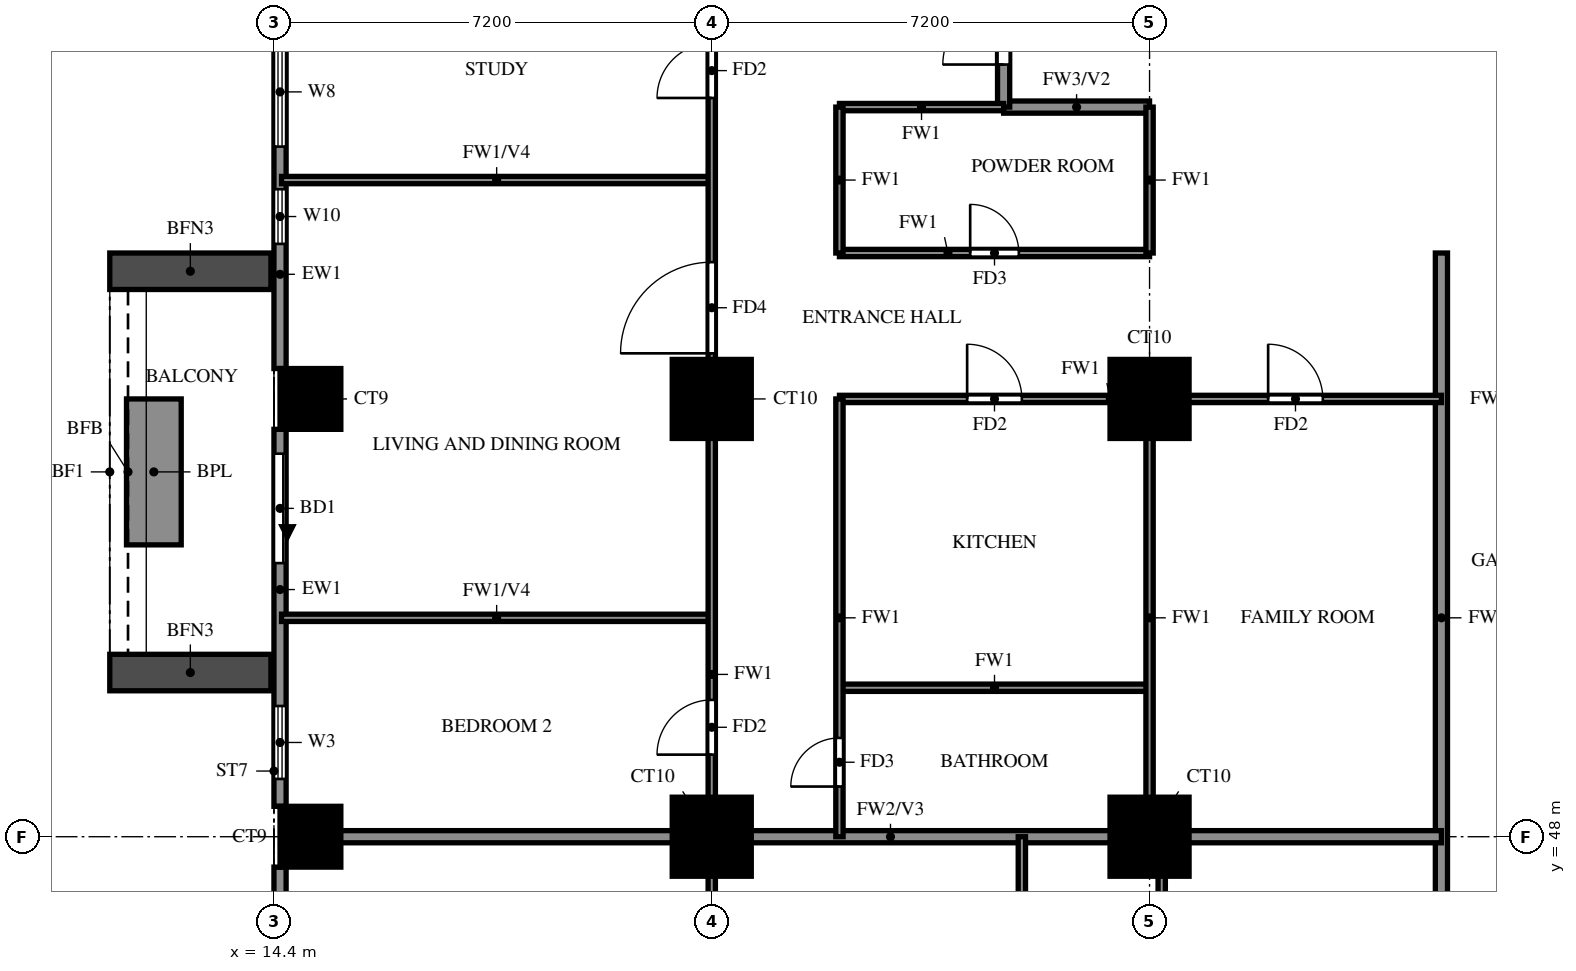
"""IFC4 building model, lengths in metres.
Left out: names, types, materials, properties, quantities, classifications, styles, units other than length and angle.
Written with IfcOpenShell. Run it as: python <this file> out.ifc"""

import sys

from ifc_helpers import new_model, si_unit, direction, frame, frame_2d, origin, origin_2d, place, context, subcontext, project, spatial, rectangle, extrude, source, transform, mapped, element, fill, save


model = new_model("IFC4")
c1 = context("Model", 3, precision=1e-05, world=origin(), true_north=direction((0.0, 1.0)))
c2 = subcontext(c1, "Body", "Model", "MODEL_VIEW")
j1 = project(units=[si_unit("LENGTHUNIT", "METRE"), si_unit("PLANEANGLEUNIT", "RADIAN")], contexts=[c1])
p1 = place(None, origin())
s1 = spatial("IfcSite", under=j1, at=p1, CompositionType="ELEMENT")
p2 = place(p1, origin())
s2 = spatial("IfcBuilding", under=s1, at=p2, CompositionType="ELEMENT")
p3 = place(p2, frame((0.0, 0.0, 83.0)))
s3 = spatial("IfcBuildingStorey", under=s2, at=p3, CompositionType="ELEMENT", Elevation=83.0)
m1 = source(origin(), c2, "Body", "SweptSolid", [
    extrude(rectangle(XDim=1.0, YDim=1.0, at=origin_2d()), origin(), (0.0, 0.0, 1.0), 3.18),
])
p4 = place(p3, frame((15.0, 48.0, 0.0), z_axis=(0.0, 0.0, 1.0), x_axis=(1.0, 0.0, 0.0)))
e1 = element("IfcColumn", 1, at=p4, inside=s3, PredefinedType="COLUMN", context=c2, shape_type="MappedRepresentation", body=[
    mapped(m1, transform((0.0, 0.0, 0.0))),
])
m2 = source(origin(), c2, "Body", "SweptSolid", [
    extrude(rectangle(XDim=1.3, YDim=1.3, at=origin_2d()), origin(), (0.0, 0.0, 1.0), 3.18),
])
for number, where, z_axis, x_axis in (
    (2, (21.6, 48.0, 0.0), (0.0, 0.0, 1.0), (1.0, 0.0, 0.0)),
    (3, (28.8, 48.0, 0.0), (0.0, 0.0, 1.0), (1.0, 0.0, 0.0)),
):
    element("IfcColumn", number, at=place(p3, frame(where, z_axis=z_axis, x_axis=x_axis)), inside=s3, PredefinedType="COLUMN", context=c2, shape_type="MappedRepresentation", body=[
        mapped(m2, transform((0.0, 0.0, 0.0))),
    ])
p5 = place(p3, frame((15.0, 55.2, 0.0), z_axis=(0.0, 0.0, 1.0), x_axis=(1.0, 0.0, 0.0)))
e4 = element("IfcColumn", 4, at=p5, inside=s3, PredefinedType="COLUMN", context=c2, shape_type="MappedRepresentation", body=[
    mapped(m1, transform((0.0, 0.0, 0.0))),
])
for number, where, z_axis, x_axis in (
    (5, (21.6, 55.2, 0.0), (0.0, 0.0, 1.0), (1.0, 0.0, 0.0)),
    (6, (28.8, 55.2, 0.0), (0.0, 0.0, 1.0), (1.0, 0.0, 0.0)),
):
    element("IfcColumn", number, at=place(p3, frame(where, z_axis=z_axis, x_axis=x_axis)), inside=s3, PredefinedType="COLUMN", context=c2, shape_type="MappedRepresentation", body=[
        mapped(m2, transform((0.0, 0.0, 0.0))),
    ])
p6 = place(p3, frame((14.5, 61.9, 0.0), z_axis=(0.0, 0.0, 1.0), x_axis=(0.0, -1.0, 0.0)))
e7 = element("IfcWall", 7, at=p6, inside=s3, PredefinedType="SOLIDWALL", context=c2, shape_type="SweptSolid", body=[
    extrude(rectangle(XDim=6.2, YDim=0.2, at=frame_2d((3.1, 0.0))), origin(), (0.0, 0.0, 1.0), 3.18),
])
p7 = place(p6, frame((3.25, 0.0, 0.6)))
e8 = element("IfcOpeningElement", 8, at=p7, cuts=e7, PredefinedType="OPENING", context=c2, shape_type="SweptSolid", body=[
    extrude(rectangle(XDim=0.9, YDim=2.4, at=frame_2d((0.45, 1.2))), frame((0.0, 0.11, 0.0), z_axis=(0.0, -1.0, 0.0), x_axis=(1.0, 0.0, 0.0)), (0.0, 0.0, 1.0), 0.22),
])
p8 = place(p6, frame((0.75, 0.0, 0.6)))
e9 = element("IfcOpeningElement", 9, at=p8, cuts=e7, PredefinedType="OPENING", context=c2, shape_type="SweptSolid", body=[
    extrude(rectangle(XDim=1.8, YDim=2.4, at=frame_2d((0.9, 1.2))), frame((0.0, 0.11, 0.0), z_axis=(0.0, -1.0, 0.0), x_axis=(1.0, 0.0, 0.0)), (0.0, 0.0, 1.0), 0.22),
])
p9 = place(p3, frame((14.5, 54.7, 0.0), z_axis=(0.0, 0.0, 1.0), x_axis=(0.0, -1.0, 0.0)))
e10 = element("IfcWall", 10, at=p9, inside=s3, PredefinedType="SOLIDWALL", context=c2, shape_type="SweptSolid", body=[
    extrude(rectangle(XDim=6.2, YDim=0.2, at=frame_2d((3.1, 0.0))), origin(), (0.0, 0.0, 1.0), 3.18),
])
p10 = place(p9, frame((0.4, 0.0, 0.0)))
e11 = element("IfcOpeningElement", 11, at=p10, cuts=e10, PredefinedType="OPENING", context=c2, shape_type="SweptSolid", body=[
    extrude(rectangle(XDim=1.8, YDim=2.4, at=frame_2d((0.9, 1.2))), frame((0.0, 0.11, 0.0), z_axis=(0.0, -1.0, 0.0), x_axis=(1.0, 0.0, 0.0)), (0.0, 0.0, 1.0), 0.22),
])
p11 = place(p9, frame((4.55, 0.0, 0.6)))
e12 = element("IfcOpeningElement", 12, at=p11, cuts=e10, PredefinedType="OPENING", context=c2, shape_type="SweptSolid", body=[
    extrude(rectangle(XDim=1.2, YDim=2.4, at=frame_2d((0.6, 1.2))), frame((0.0, 0.11, 0.0), z_axis=(0.0, -1.0, 0.0), x_axis=(1.0, 0.0, 0.0)), (0.0, 0.0, 1.0), 0.22),
])
p12 = place(p3, frame((14.5, 47.5, 0.0), z_axis=(0.0, 0.0, 1.0), x_axis=(0.0, -1.0, 0.0)))
e13 = element("IfcWall", 13, at=p12, inside=s3, PredefinedType="SOLIDWALL", context=c2, shape_type="SweptSolid", body=[
    extrude(rectangle(XDim=6.2, YDim=0.2, at=frame_2d((3.1, 0.0))), origin(), (0.0, 0.0, 1.0), 3.18),
])
p13 = place(p12, frame((1.9, 0.0, 0.6)))
e14 = element("IfcOpeningElement", 14, at=p13, cuts=e13, PredefinedType="OPENING", context=c2, shape_type="SweptSolid", body=[
    extrude(rectangle(XDim=2.4, YDim=2.4, at=frame_2d((1.2, 1.2))), frame((0.0, 0.11, 0.0), z_axis=(0.0, -1.0, 0.0), x_axis=(1.0, 0.0, 0.0)), (0.0, 0.0, 1.0), 0.22),
])
for number, where, z_axis, x_axis in (
    (15, (14.35, 57.3, 0.0), (0.0, 0.0, 1.0), (-1.0, 0.0, 0.0)),
    (16, (14.35, 50.7, 0.0), (0.0, 0.0, 1.0), (-1.0, 0.0, 0.0)),
):
    element("IfcWall", number, at=place(p3, frame(where, z_axis=z_axis, x_axis=x_axis)), inside=s3, PredefinedType="SOLIDWALL", context=c2, shape_type="SweptSolid", body=[
        extrude(rectangle(XDim=2.65, YDim=0.6, at=frame_2d((1.325, 0.0))), origin(), (0.0, 0.0, 1.0), 2.85),
    ])
p14 = place(p3, frame((12.425, 55.2, 0.0), z_axis=(0.0, 0.0, 1.0), x_axis=(0.0, -1.0, 0.0)))
e17 = element("IfcWall", 17, at=p14, inside=s3, PredefinedType="SOLIDWALL", context=c2, shape_type="SweptSolid", body=[
    extrude(rectangle(XDim=2.4, YDim=0.9, at=frame_2d((1.2, 0.0))), origin(), (0.0, 0.0, 1.0), 0.9),
])
p15 = place(p3, frame((26.4, 60.0, 0.0), z_axis=(0.0, 0.0, 1.0), x_axis=(1.0, 0.0, 0.0)))
e18 = element("IfcWall", 18, at=p15, inside=s3, PredefinedType="SOLIDWALL", context=c2, shape_type="SweptSolid", body=[
    extrude(rectangle(XDim=2.4, YDim=0.2, at=frame_2d((1.2, 0.0))), origin(), (0.0, 0.0, 1.0), 3.18),
])
p16 = place(p3, frame((26.4, 60.0, 0.0), z_axis=(0.0, 0.0, 1.0), x_axis=(0.0, 1.0, 0.0)))
e19 = element("IfcWall", 19, at=p16, inside=s3, PredefinedType="SOLIDWALL", context=c2, shape_type="SweptSolid", body=[
    extrude(rectangle(XDim=9.45, YDim=0.2, at=frame_2d((4.725, 0.0))), origin(), (0.0, 0.0, 1.0), 3.18),
])
p17 = place(p16, frame((0.7, 0.0, 0.0)))
e20 = element("IfcOpeningElement", 20, at=p17, cuts=e19, PredefinedType="OPENING", context=c2, shape_type="SweptSolid", body=[
    extrude(rectangle(XDim=1.0, YDim=2.1, at=frame_2d((0.5, 1.05))), frame((0.0, 0.11, 0.0), z_axis=(0.0, -1.0, 0.0), x_axis=(1.0, 0.0, 0.0)), (0.0, 0.0, 1.0), 0.22),
])
p18 = place(p16, frame((3.1, 0.0, 0.0)))
e21 = element("IfcOpeningElement", 21, at=p18, cuts=e19, PredefinedType="OPENING", context=c2, shape_type="SweptSolid", body=[
    extrude(rectangle(XDim=1.0, YDim=2.1, at=frame_2d((0.5, 1.05))), frame((0.0, 0.11, 0.0), z_axis=(0.0, -1.0, 0.0), x_axis=(1.0, 0.0, 0.0)), (0.0, 0.0, 1.0), 0.22),
])
p19 = place(p3, frame((33.6, 45.6, 0.0), z_axis=(0.0, 0.0, 1.0), x_axis=(0.0, 1.0, 0.0)))
e22 = element("IfcWall", 22, at=p19, inside=s3, PredefinedType="SOLIDWALL", context=c2, shape_type="SweptSolid", body=[
    extrude(rectangle(XDim=12.0, YDim=0.2, at=frame_2d((6.0, 0.0))), origin(), (0.0, 0.0, 1.0), 3.18),
])
p20 = place(p3, frame((14.525, 48.0, 0.0), z_axis=(0.0, 0.0, 1.0), x_axis=(1.0, 0.0, 0.0)))
e23 = element("IfcWall", 23, at=p20, inside=s3, PredefinedType="SOLIDWALL", context=c2, shape_type="SweptSolid", body=[
    extrude(rectangle(XDim=19.075, YDim=0.2, at=frame_2d((9.538, 0.0))), origin(), (0.0, 0.0, 1.0), 3.18),
])
p21 = place(p3, frame((23.7, 50.45, 0.0), z_axis=(0.0, 0.0, 1.0), x_axis=(1.0, 0.0, 0.0)))
e24 = element("IfcWall", 24, at=p21, inside=s3, PredefinedType="PARTITIONING", context=c2, shape_type="SweptSolid", body=[
    extrude(rectangle(XDim=5.1, YDim=0.12, at=frame_2d((2.55, 0.0))), origin(), (0.0, 0.0, 1.0), 3.18),
])
p22 = place(p3, frame((14.525, 51.6, 0.0), z_axis=(0.0, 0.0, 1.0), x_axis=(1.0, 0.0, 0.0)))
e25 = element("IfcWall", 25, at=p22, inside=s3, PredefinedType="PARTITIONING", context=c2, shape_type="SweptSolid", body=[
    extrude(rectangle(XDim=7.075, YDim=0.12, at=frame_2d((3.538, 0.0))), origin(), (0.0, 0.0, 1.0), 2.28),
])
p23 = place(p3, frame((23.7, 55.2, 0.0), z_axis=(0.0, 0.0, 1.0), x_axis=(1.0, 0.0, 0.0)))
e26 = element("IfcWall", 26, at=p23, inside=s3, PredefinedType="PARTITIONING", context=c2, shape_type="SweptSolid", body=[
    extrude(rectangle(XDim=9.9, YDim=0.12, at=frame_2d((4.95, 0.0))), origin(), (0.0, 0.0, 1.0), 3.18),
])
p24 = place(p23, frame((2.1, 0.0, 0.0)))
e27 = element("IfcOpeningElement", 27, at=p24, cuts=e26, PredefinedType="OPENING", context=c2, shape_type="SweptSolid", body=[
    extrude(rectangle(XDim=0.9, YDim=2.1, at=frame_2d((0.45, 1.05))), frame((0.0, 0.07, 0.0), z_axis=(0.0, -1.0, 0.0), x_axis=(1.0, 0.0, 0.0)), (0.0, 0.0, 1.0), 0.14),
])
p25 = place(p23, frame((7.05, 0.0, 0.0)))
e28 = element("IfcOpeningElement", 28, at=p25, cuts=e26, PredefinedType="OPENING", context=c2, shape_type="SweptSolid", body=[
    extrude(rectangle(XDim=0.9, YDim=2.1, at=frame_2d((0.45, 1.05))), frame((0.0, 0.07, 0.0), z_axis=(0.0, -1.0, 0.0), x_axis=(1.0, 0.0, 0.0)), (0.0, 0.0, 1.0), 0.14),
])
p26 = place(p3, frame((23.7, 57.6, 0.0), z_axis=(0.0, 0.0, 1.0), x_axis=(1.0, 0.0, 0.0)))
e29 = element("IfcWall", 29, at=p26, inside=s3, PredefinedType="PARTITIONING", context=c2, shape_type="SweptSolid", body=[
    extrude(rectangle(XDim=5.1, YDim=0.12, at=frame_2d((2.55, 0.0))), origin(), (0.0, 0.0, 1.0), 3.18),
])
p27 = place(p26, frame((2.15, 0.0, 0.0)))
e30 = element("IfcOpeningElement", 30, at=p27, cuts=e29, PredefinedType="OPENING", context=c2, shape_type="SweptSolid", body=[
    extrude(rectangle(XDim=0.8, YDim=2.1, at=frame_2d((0.4, 1.05))), frame((0.0, 0.07, 0.0), z_axis=(0.0, -1.0, 0.0), x_axis=(1.0, 0.0, 0.0)), (0.0, 0.0, 1.0), 0.14),
])
p28 = place(p3, frame((14.525, 58.8, 0.0), z_axis=(0.0, 0.0, 1.0), x_axis=(1.0, 0.0, 0.0)))
e31 = element("IfcWall", 31, at=p28, inside=s3, PredefinedType="PARTITIONING", context=c2, shape_type="SweptSolid", body=[
    extrude(rectangle(XDim=7.075, YDim=0.12, at=frame_2d((3.538, 0.0))), origin(), (0.0, 0.0, 1.0), 2.28),
])
p29 = place(p3, frame((23.7, 60.0, 0.0), z_axis=(0.0, 0.0, 1.0), x_axis=(1.0, 0.0, 0.0)))
e32 = element("IfcWall", 32, at=p29, inside=s3, PredefinedType="PARTITIONING", context=c2, shape_type="SweptSolid", body=[
    extrude(rectangle(XDim=2.7, YDim=0.12, at=frame_2d((1.35, 0.0))), origin(), (0.0, 0.0, 1.0), 3.18),
])
p30 = place(p3, frame((21.6, 33.725, 0.0), z_axis=(0.0, 0.0, 1.0), x_axis=(0.0, 1.0, 0.0)))
e33 = element("IfcWall", 33, at=p30, inside=s3, PredefinedType="PARTITIONING", context=c2, shape_type="SweptSolid", body=[
    extrude(rectangle(XDim=32.275, YDim=0.12, at=frame_2d((16.137, 0.0))), origin(), (0.0, 0.0, 1.0), 3.18),
])
p31 = place(p30, frame((7.775, 0.0, 0.0)))
e34 = element("IfcOpeningElement", 34, at=p31, cuts=e33, PredefinedType="OPENING", context=c2, shape_type="SweptSolid", body=[
    extrude(rectangle(XDim=0.9, YDim=2.1, at=frame_2d((0.45, 1.05))), frame((0.0, 0.07, 0.0), z_axis=(0.0, -1.0, 0.0), x_axis=(1.0, 0.0, 0.0)), (0.0, 0.0, 1.0), 0.14),
])
p32 = place(p30, frame((15.625, 0.0, 0.0)))
e35 = element("IfcOpeningElement", 35, at=p32, cuts=e33, PredefinedType="OPENING", context=c2, shape_type="SweptSolid", body=[
    extrude(rectangle(XDim=0.9, YDim=2.1, at=frame_2d((0.45, 1.05))), frame((0.0, 0.07, 0.0), z_axis=(0.0, -1.0, 0.0), x_axis=(1.0, 0.0, 0.0)), (0.0, 0.0, 1.0), 0.14),
])
p33 = place(p30, frame((22.225, 0.0, 0.0)))
e36 = element("IfcOpeningElement", 36, at=p33, cuts=e33, PredefinedType="OPENING", context=c2, shape_type="SweptSolid", body=[
    extrude(rectangle(XDim=1.5, YDim=2.1, at=frame_2d((0.75, 1.05))), frame((0.0, 0.07, 0.0), z_axis=(0.0, -1.0, 0.0), x_axis=(1.0, 0.0, 0.0)), (0.0, 0.0, 1.0), 0.14),
])
p34 = place(p30, frame((26.425, 0.0, 0.0)))
e37 = element("IfcOpeningElement", 37, at=p34, cuts=e33, PredefinedType="OPENING", context=c2, shape_type="SweptSolid", body=[
    extrude(rectangle(XDim=0.9, YDim=2.1, at=frame_2d((0.45, 1.05))), frame((0.0, 0.07, 0.0), z_axis=(0.0, -1.0, 0.0), x_axis=(1.0, 0.0, 0.0)), (0.0, 0.0, 1.0), 0.14),
])
p35 = place(p30, frame((30.025, 0.0, 0.0)))
e38 = element("IfcOpeningElement", 38, at=p35, cuts=e33, PredefinedType="OPENING", context=c2, shape_type="SweptSolid", body=[
    extrude(rectangle(XDim=0.9, YDim=2.1, at=frame_2d((0.45, 1.05))), frame((0.0, 0.07, 0.0), z_axis=(0.0, -1.0, 0.0), x_axis=(1.0, 0.0, 0.0)), (0.0, 0.0, 1.0), 0.14),
])
p36 = place(p3, frame((23.7, 48.0, 0.0), z_axis=(0.0, 0.0, 1.0), x_axis=(0.0, 1.0, 0.0)))
e39 = element("IfcWall", 39, at=p36, inside=s3, PredefinedType="PARTITIONING", context=c2, shape_type="SweptSolid", body=[
    extrude(rectangle(XDim=7.2, YDim=0.12, at=frame_2d((3.6, 0.0))), origin(), (0.0, 0.0, 1.0), 3.18),
])
p37 = place(p36, frame((0.825, 0.0, 0.0)))
e40 = element("IfcOpeningElement", 40, at=p37, cuts=e39, PredefinedType="OPENING", context=c2, shape_type="SweptSolid", body=[
    extrude(rectangle(XDim=0.8, YDim=2.1, at=frame_2d((0.4, 1.05))), frame((0.0, 0.07, 0.0), z_axis=(0.0, -1.0, 0.0), x_axis=(1.0, 0.0, 0.0)), (0.0, 0.0, 1.0), 0.14),
])
p38 = place(p3, frame((23.7, 57.6, 0.0), z_axis=(0.0, 0.0, 1.0), x_axis=(0.0, 1.0, 0.0)))
e41 = element("IfcWall", 41, at=p38, inside=s3, PredefinedType="PARTITIONING", context=c2, shape_type="SweptSolid", body=[
    extrude(rectangle(XDim=2.4, YDim=0.12, at=frame_2d((1.2, 0.0))), origin(), (0.0, 0.0, 1.0), 3.18),
])
p39 = place(p3, frame((26.7, 42.9, 0.0), z_axis=(0.0, 0.0, 1.0), x_axis=(0.0, 1.0, 0.0)))
e42 = element("IfcWall", 42, at=p39, inside=s3, PredefinedType="PARTITIONING", context=c2, shape_type="SweptSolid", body=[
    extrude(rectangle(XDim=5.1, YDim=0.12, at=frame_2d((2.55, 0.0))), origin(), (0.0, 0.0, 1.0), 3.18),
])
p40 = place(p3, frame((28.8, 48.0, 0.0), z_axis=(0.0, 0.0, 1.0), x_axis=(0.0, 1.0, 0.0)))
e43 = element("IfcWall", 43, at=p40, inside=s3, PredefinedType="PARTITIONING", context=c2, shape_type="SweptSolid", body=[
    extrude(rectangle(XDim=7.2, YDim=0.12, at=frame_2d((3.6, 0.0))), origin(), (0.0, 0.0, 1.0), 3.18),
])
p41 = place(p3, frame((28.8, 57.6, 0.0), z_axis=(0.0, 0.0, 1.0), x_axis=(0.0, 1.0, 0.0)))
e44 = element("IfcWall", 44, at=p41, inside=s3, PredefinedType="PARTITIONING", context=c2, shape_type="SweptSolid", body=[
    extrude(rectangle(XDim=2.4, YDim=0.12, at=frame_2d((1.2, 0.0))), origin(), (0.0, 0.0, 1.0), 3.18),
])
p42 = place(p3, frame((29.0, 42.9, 0.0), z_axis=(0.0, 0.0, 1.0), x_axis=(0.0, 1.0, 0.0)))
e45 = element("IfcWall", 45, at=p42, inside=s3, PredefinedType="PARTITIONING", context=c2, shape_type="SweptSolid", body=[
    extrude(rectangle(XDim=5.1, YDim=0.12, at=frame_2d((2.55, 0.0))), origin(), (0.0, 0.0, 1.0), 3.18),
])
p43 = place(p7, origin())
e46 = element("IfcWindow", 46, at=p43, inside=s3, PartitioningType="SINGLE_PANEL", PredefinedType="WINDOW", context=c2, shape_type="SweptSolid", body=[
    extrude(rectangle(XDim=0.9, YDim=2.4, at=frame_2d((0.45, 1.2))), frame((0.0, 0.03, 0.0), z_axis=(0.0, -1.0, 0.0), x_axis=(1.0, 0.0, 0.0)), (0.0, 0.0, 1.0), 0.06),
])
fill(e8, e46)
p44 = place(p8, origin())
e47 = element("IfcWindow", 47, at=p44, inside=s3, PartitioningType="DOUBLE_PANEL_VERTICAL", PredefinedType="WINDOW", context=c2, shape_type="SweptSolid", body=[
    extrude(rectangle(XDim=1.8, YDim=2.4, at=frame_2d((0.9, 1.2))), frame((0.0, 0.03, 0.0), z_axis=(0.0, -1.0, 0.0), x_axis=(1.0, 0.0, 0.0)), (0.0, 0.0, 1.0), 0.06),
])
fill(e9, e47)
p45 = place(p10, origin())
e48 = element("IfcDoor", 48, at=p45, inside=s3, OperationType="DOUBLE_DOOR_SLIDING", PredefinedType="DOOR", context=c2, shape_type="SweptSolid", body=[
    extrude(rectangle(XDim=1.8, YDim=2.4, at=frame_2d((0.9, 1.2))), frame((0.0, 0.025, 0.0), z_axis=(0.0, -1.0, 0.0), x_axis=(1.0, 0.0, 0.0)), (0.0, 0.0, 1.0), 0.05),
])
fill(e11, e48)
p46 = place(p11, origin())
e49 = element("IfcWindow", 49, at=p46, inside=s3, PartitioningType="SINGLE_PANEL", PredefinedType="WINDOW", context=c2, shape_type="SweptSolid", body=[
    extrude(rectangle(XDim=1.2, YDim=2.4, at=frame_2d((0.6, 1.2))), frame((0.0, 0.03, 0.0), z_axis=(0.0, -1.0, 0.0), x_axis=(1.0, 0.0, 0.0)), (0.0, 0.0, 1.0), 0.06),
])
fill(e12, e49)
p47 = place(p17, origin())
e50 = element("IfcDoor", 50, at=p47, inside=s3, OperationType="SINGLE_SWING_RIGHT", PredefinedType="DOOR", context=c2, shape_type="SweptSolid", body=[
    extrude(rectangle(XDim=1.0, YDim=2.1, at=frame_2d((0.5, 1.05))), frame((0.0, 0.025, 0.0), z_axis=(0.0, -1.0, 0.0), x_axis=(1.0, 0.0, 0.0)), (0.0, 0.0, 1.0), 0.05),
])
fill(e20, e50)
p48 = place(p32, origin())
e51 = element("IfcDoor", 51, at=p48, inside=s3, OperationType="SINGLE_SWING_LEFT", PredefinedType="DOOR", context=c2, shape_type="SweptSolid", body=[
    extrude(rectangle(XDim=0.9, YDim=2.1, at=frame_2d((0.45, 1.05))), frame((0.0, 0.025, 0.0), z_axis=(0.0, -1.0, 0.0), x_axis=(1.0, 0.0, 0.0)), (0.0, 0.0, 1.0), 0.05),
])
fill(e35, e51)
p49 = place(p33, origin())
e52 = element("IfcDoor", 52, at=p49, inside=s3, OperationType="SINGLE_SWING_RIGHT", PredefinedType="DOOR", context=c2, shape_type="SweptSolid", body=[
    extrude(rectangle(XDim=1.5, YDim=2.1, at=frame_2d((0.75, 1.05))), frame((0.0, 0.025, 0.0), z_axis=(0.0, -1.0, 0.0), x_axis=(1.0, 0.0, 0.0)), (0.0, 0.0, 1.0), 0.05),
])
fill(e36, e52)
p50 = place(p34, origin())
e53 = element("IfcDoor", 53, at=p50, inside=s3, OperationType="SINGLE_SWING_RIGHT", PredefinedType="DOOR", context=c2, shape_type="SweptSolid", body=[
    extrude(rectangle(XDim=0.9, YDim=2.1, at=frame_2d((0.45, 1.05))), frame((0.0, 0.025, 0.0), z_axis=(0.0, -1.0, 0.0), x_axis=(1.0, 0.0, 0.0)), (0.0, 0.0, 1.0), 0.05),
])
fill(e37, e53)
p51 = place(p37, origin())
e54 = element("IfcDoor", 54, at=p51, inside=s3, OperationType="SINGLE_SWING_LEFT", PredefinedType="DOOR", context=c2, shape_type="SweptSolid", body=[
    extrude(rectangle(XDim=0.8, YDim=2.1, at=frame_2d((0.4, 1.05))), frame((0.0, 0.025, 0.0), z_axis=(0.0, -1.0, 0.0), x_axis=(1.0, 0.0, 0.0)), (0.0, 0.0, 1.0), 0.05),
])
fill(e40, e54)
p52 = place(p24, origin())
e55 = element("IfcDoor", 55, at=p52, inside=s3, OperationType="SINGLE_SWING_LEFT", PredefinedType="DOOR", context=c2, shape_type="SweptSolid", body=[
    extrude(rectangle(XDim=0.9, YDim=2.1, at=frame_2d((0.45, 1.05))), frame((0.0, 0.025, 0.0), z_axis=(0.0, -1.0, 0.0), x_axis=(1.0, 0.0, 0.0)), (0.0, 0.0, 1.0), 0.05),
])
fill(e27, e55)
p53 = place(p27, origin())
e56 = element("IfcDoor", 56, at=p53, inside=s3, OperationType="SINGLE_SWING_RIGHT", PredefinedType="DOOR", context=c2, shape_type="SweptSolid", body=[
    extrude(rectangle(XDim=0.8, YDim=2.1, at=frame_2d((0.4, 1.05))), frame((0.0, 0.025, 0.0), z_axis=(0.0, -1.0, 0.0), x_axis=(1.0, 0.0, 0.0)), (0.0, 0.0, 1.0), 0.05),
])
fill(e30, e56)
p54 = place(p25, origin())
e57 = element("IfcDoor", 57, at=p54, inside=s3, OperationType="SINGLE_SWING_LEFT", PredefinedType="DOOR", context=c2, shape_type="SweptSolid", body=[
    extrude(rectangle(XDim=0.9, YDim=2.1, at=frame_2d((0.45, 1.05))), frame((0.0, 0.025, 0.0), z_axis=(0.0, -1.0, 0.0), x_axis=(1.0, 0.0, 0.0)), (0.0, 0.0, 1.0), 0.05),
])
fill(e28, e57)
save(model, sys.argv[1])
